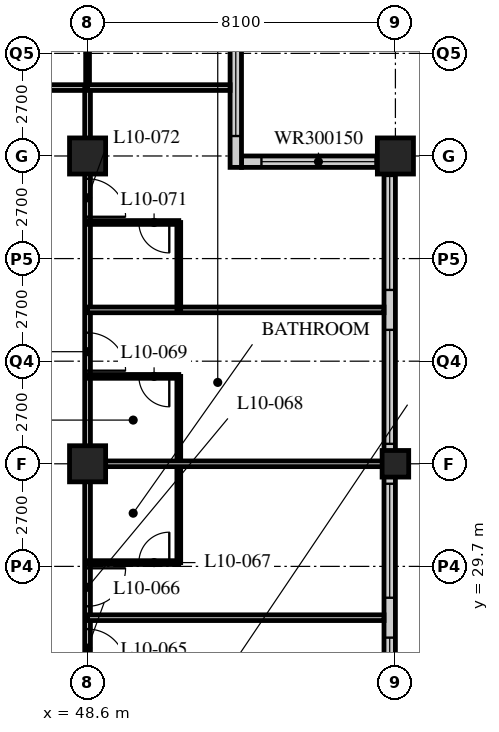
"""IFC4 building model, lengths in metres.
Left out: names, types, materials, properties, quantities, classifications, styles, units other than length and angle.
Written with IfcOpenShell. Run it as: python <this file> out.ifc"""

import sys

from ifc_helpers import new_model, si_unit, direction, frame, frame_2d, origin, origin_2d, place, context, subcontext, project, spatial, rectangle, hollow_rectangle, extrude, element, fill, save


model = new_model("IFC4")
c1 = context("Model", 3, precision=1e-05, world=origin(), true_north=direction((0.0, 1.0)))
c2 = subcontext(c1, "Body", "Model", "MODEL_VIEW")
j1 = project(units=[si_unit("LENGTHUNIT", "METRE"), si_unit("PLANEANGLEUNIT", "RADIAN")], contexts=[c1])
p1 = place(None, origin())
s1 = spatial("IfcSite", under=j1, at=p1, CompositionType="ELEMENT")
p2 = place(p1, origin())
s2 = spatial("IfcBuilding", under=s1, at=p2, CompositionType="ELEMENT")
p3 = place(p2, frame((0.0, 0.0, 46.6)))
s3 = spatial("IfcBuildingStorey", under=s2, at=p3, CompositionType="ELEMENT", Elevation=46.6)
for number, where, z_axis, x_axis in (
    (1, (48.6, 32.4, 0.0), (0.0, 0.0, 1.0), (1.0, 0.0, 0.0)),
    (2, (48.6, 40.5, 0.0), (0.0, 0.0, 1.0), (1.0, 0.0, 0.0)),
):
    element("IfcColumn", number, at=place(p3, frame(where, z_axis=z_axis, x_axis=x_axis)), inside=s3, PredefinedType="COLUMN", context=c2, shape_type="SweptSolid", body=[
        extrude(hollow_rectangle(XDim=0.95, YDim=0.95, WallThickness=0.095, at=origin_2d()), origin(), (0.0, 0.0, 1.0), 3.4),
    ])
p4 = place(p3, frame((56.7, 32.4, 0.0), z_axis=(0.0, 0.0, 1.0), x_axis=(1.0, 0.0, 0.0)))
e3 = element("IfcColumn", 3, at=p4, inside=s3, PredefinedType="COLUMN", context=c2, shape_type="SweptSolid", body=[
    extrude(hollow_rectangle(XDim=0.7, YDim=0.7, WallThickness=0.06, at=origin_2d()), origin(), (0.0, 0.0, 1.0), 3.4),
])
p5 = place(p3, frame((56.7, 40.5, 0.0), z_axis=(0.0, 0.0, 1.0), x_axis=(1.0, 0.0, 0.0)))
e4 = element("IfcColumn", 4, at=p5, inside=s3, PredefinedType="COLUMN", context=c2, shape_type="SweptSolid", body=[
    extrude(hollow_rectangle(XDim=0.95, YDim=0.95, WallThickness=0.095, at=origin_2d()), origin(), (0.0, 0.0, 1.0), 3.4),
])
p6 = place(p3, frame((56.55, 8.4, 0.0), z_axis=(0.0, 0.0, 1.0), x_axis=(0.0, 1.0, 0.0)))
e5 = element("IfcWall", 5, at=p6, inside=s3, PredefinedType="SOLIDWALL", context=c2, shape_type="SweptSolid", body=[
    extrude(rectangle(XDim=32.1, YDim=0.3, at=frame_2d((16.05, 0.0))), origin(), (0.0, 0.0, 1.0), 3.19),
])
p7 = place(p6, frame((0.225, 0.0, 0.9)))
e6 = element("IfcOpeningElement", 6, at=p7, cuts=e5, PredefinedType="OPENING", context=c2, shape_type="SweptSolid", body=[
    extrude(rectangle(XDim=3.0, YDim=2.0, at=frame_2d((1.5, 1.0))), frame((0.0, 0.16, 0.0), z_axis=(0.0, -1.0, 0.0), x_axis=(1.0, 0.0, 0.0)), (0.0, 0.0, 1.0), 0.32),
])
p8 = place(p6, frame((4.275, 0.0, 0.9)))
e7 = element("IfcOpeningElement", 7, at=p8, cuts=e5, PredefinedType="OPENING", context=c2, shape_type="SweptSolid", body=[
    extrude(rectangle(XDim=3.0, YDim=2.0, at=frame_2d((1.5, 1.0))), frame((0.0, 0.16, 0.0), z_axis=(0.0, -1.0, 0.0), x_axis=(1.0, 0.0, 0.0)), (0.0, 0.0, 1.0), 0.32),
])
p9 = place(p6, frame((8.325, 0.0, 0.9)))
e8 = element("IfcOpeningElement", 8, at=p9, cuts=e5, PredefinedType="OPENING", context=c2, shape_type="SweptSolid", body=[
    extrude(rectangle(XDim=3.0, YDim=2.0, at=frame_2d((1.5, 1.0))), frame((0.0, 0.16, 0.0), z_axis=(0.0, -1.0, 0.0), x_axis=(1.0, 0.0, 0.0)), (0.0, 0.0, 1.0), 0.32),
])
p10 = place(p6, frame((12.375, 0.0, 0.9)))
e9 = element("IfcOpeningElement", 9, at=p10, cuts=e5, PredefinedType="OPENING", context=c2, shape_type="SweptSolid", body=[
    extrude(rectangle(XDim=3.0, YDim=2.0, at=frame_2d((1.5, 1.0))), frame((0.0, 0.16, 0.0), z_axis=(0.0, -1.0, 0.0), x_axis=(1.0, 0.0, 0.0)), (0.0, 0.0, 1.0), 0.32),
])
p11 = place(p6, frame((16.425, 0.0, 0.9)))
e10 = element("IfcOpeningElement", 10, at=p11, cuts=e5, PredefinedType="OPENING", context=c2, shape_type="SweptSolid", body=[
    extrude(rectangle(XDim=3.0, YDim=2.0, at=frame_2d((1.5, 1.0))), frame((0.0, 0.16, 0.0), z_axis=(0.0, -1.0, 0.0), x_axis=(1.0, 0.0, 0.0)), (0.0, 0.0, 1.0), 0.32),
])
p12 = place(p6, frame((20.475, 0.0, 0.9)))
e11 = element("IfcOpeningElement", 11, at=p12, cuts=e5, PredefinedType="OPENING", context=c2, shape_type="SweptSolid", body=[
    extrude(rectangle(XDim=3.0, YDim=2.0, at=frame_2d((1.5, 1.0))), frame((0.0, 0.16, 0.0), z_axis=(0.0, -1.0, 0.0), x_axis=(1.0, 0.0, 0.0)), (0.0, 0.0, 1.0), 0.32),
])
p13 = place(p6, frame((24.525, 0.0, 0.9)))
e12 = element("IfcOpeningElement", 12, at=p13, cuts=e5, PredefinedType="OPENING", context=c2, shape_type="SweptSolid", body=[
    extrude(rectangle(XDim=3.0, YDim=2.0, at=frame_2d((1.5, 1.0))), frame((0.0, 0.16, 0.0), z_axis=(0.0, -1.0, 0.0), x_axis=(1.0, 0.0, 0.0)), (0.0, 0.0, 1.0), 0.32),
])
p14 = place(p6, frame((28.575, 0.0, 0.9)))
e13 = element("IfcOpeningElement", 13, at=p14, cuts=e5, PredefinedType="OPENING", context=c2, shape_type="SweptSolid", body=[
    extrude(rectangle(XDim=3.0, YDim=2.0, at=frame_2d((1.5, 1.0))), frame((0.0, 0.16, 0.0), z_axis=(0.0, -1.0, 0.0), x_axis=(1.0, 0.0, 0.0)), (0.0, 0.0, 1.0), 0.32),
])
p15 = place(p3, frame((56.4, 40.35, 0.0), z_axis=(0.0, 0.0, 1.0), x_axis=(-1.0, 0.0, 0.0)))
e14 = element("IfcWall", 14, at=p15, inside=s3, PredefinedType="SOLIDWALL", context=c2, shape_type="SweptSolid", body=[
    extrude(rectangle(XDim=3.75, YDim=0.3, at=frame_2d((1.875, 0.0))), origin(), (0.0, 0.0, 1.0), 3.19),
])
p16 = place(p15, frame((0.225, 0.0, 0.9)))
e15 = element("IfcOpeningElement", 15, at=p16, cuts=e14, PredefinedType="OPENING", context=c2, shape_type="SweptSolid", body=[
    extrude(rectangle(XDim=3.0, YDim=1.5, at=frame_2d((1.5, 0.75))), frame((0.0, 0.16, 0.0), z_axis=(0.0, -1.0, 0.0), x_axis=(1.0, 0.0, 0.0)), (0.0, 0.0, 1.0), 0.32),
])
p17 = place(p3, frame((52.5, 40.2, 0.0), z_axis=(0.0, 0.0, 1.0), x_axis=(0.0, 1.0, 0.0)))
e16 = element("IfcWall", 16, at=p17, inside=s3, PredefinedType="SOLIDWALL", context=c2, shape_type="SweptSolid", body=[
    extrude(rectangle(XDim=4.35, YDim=0.3, at=frame_2d((2.175, 0.0))), origin(), (0.0, 0.0, 1.0), 3.19),
])
p18 = place(p17, frame((0.825, 0.0, 0.9)))
e17 = element("IfcOpeningElement", 17, at=p18, cuts=e16, PredefinedType="OPENING", context=c2, shape_type="SweptSolid", body=[
    extrude(rectangle(XDim=3.0, YDim=1.5, at=frame_2d((1.5, 0.75))), frame((0.0, 0.16, 0.0), z_axis=(0.0, -1.0, 0.0), x_axis=(1.0, 0.0, 0.0)), (0.0, 0.0, 1.0), 0.32),
])
p19 = place(p3, frame((8.1, 42.3, 0.0), z_axis=(0.0, 0.0, 1.0), x_axis=(1.0, 0.0, 0.0)))
e18 = element("IfcWall", 18, at=p19, inside=s3, PredefinedType="PARTITIONING", context=c2, shape_type="SweptSolid", body=[
    extrude(rectangle(XDim=40.5, YDim=0.15, at=frame_2d((20.25, 0.0))), origin(), (0.0, 0.0, 1.0), 3.19),
])
p20 = place(p19, frame((6.5, 0.0, 0.0)))
e19 = element("IfcOpeningElement", 19, at=p20, cuts=e18, PredefinedType="OPENING", context=c2, shape_type="SweptSolid", body=[
    extrude(rectangle(XDim=1.0, YDim=2.1, at=frame_2d((0.5, 1.05))), frame((0.0, 0.085, 0.0), z_axis=(0.0, -1.0, 0.0), x_axis=(1.0, 0.0, 0.0)), (0.0, 0.0, 1.0), 0.17),
])
p21 = place(p19, frame((10.55, 0.0, 0.0)))
e20 = element("IfcOpeningElement", 20, at=p21, cuts=e18, PredefinedType="OPENING", context=c2, shape_type="SweptSolid", body=[
    extrude(rectangle(XDim=1.0, YDim=2.1, at=frame_2d((0.5, 1.05))), frame((0.0, 0.085, 0.0), z_axis=(0.0, -1.0, 0.0), x_axis=(1.0, 0.0, 0.0)), (0.0, 0.0, 1.0), 0.17),
])
p22 = place(p19, frame((14.6, 0.0, 0.0)))
e21 = element("IfcOpeningElement", 21, at=p22, cuts=e18, PredefinedType="OPENING", context=c2, shape_type="SweptSolid", body=[
    extrude(rectangle(XDim=1.0, YDim=2.1, at=frame_2d((0.5, 1.05))), frame((0.0, 0.085, 0.0), z_axis=(0.0, -1.0, 0.0), x_axis=(1.0, 0.0, 0.0)), (0.0, 0.0, 1.0), 0.17),
])
p23 = place(p19, frame((18.65, 0.0, 0.0)))
e22 = element("IfcOpeningElement", 22, at=p23, cuts=e18, PredefinedType="OPENING", context=c2, shape_type="SweptSolid", body=[
    extrude(rectangle(XDim=1.0, YDim=2.1, at=frame_2d((0.5, 1.05))), frame((0.0, 0.085, 0.0), z_axis=(0.0, -1.0, 0.0), x_axis=(1.0, 0.0, 0.0)), (0.0, 0.0, 1.0), 0.17),
])
p24 = place(p19, frame((22.7, 0.0, 0.0)))
e23 = element("IfcOpeningElement", 23, at=p24, cuts=e18, PredefinedType="OPENING", context=c2, shape_type="SweptSolid", body=[
    extrude(rectangle(XDim=1.0, YDim=2.1, at=frame_2d((0.5, 1.05))), frame((0.0, 0.085, 0.0), z_axis=(0.0, -1.0, 0.0), x_axis=(1.0, 0.0, 0.0)), (0.0, 0.0, 1.0), 0.17),
])
p25 = place(p19, frame((26.75, 0.0, 0.0)))
e24 = element("IfcOpeningElement", 24, at=p25, cuts=e18, PredefinedType="OPENING", context=c2, shape_type="SweptSolid", body=[
    extrude(rectangle(XDim=1.0, YDim=2.1, at=frame_2d((0.5, 1.05))), frame((0.0, 0.085, 0.0), z_axis=(0.0, -1.0, 0.0), x_axis=(1.0, 0.0, 0.0)), (0.0, 0.0, 1.0), 0.17),
])
p26 = place(p19, frame((30.8, 0.0, 0.0)))
e25 = element("IfcOpeningElement", 25, at=p26, cuts=e18, PredefinedType="OPENING", context=c2, shape_type="SweptSolid", body=[
    extrude(rectangle(XDim=1.0, YDim=2.1, at=frame_2d((0.5, 1.05))), frame((0.0, 0.085, 0.0), z_axis=(0.0, -1.0, 0.0), x_axis=(1.0, 0.0, 0.0)), (0.0, 0.0, 1.0), 0.17),
])
p27 = place(p19, frame((34.85, 0.0, 0.0)))
e26 = element("IfcOpeningElement", 26, at=p27, cuts=e18, PredefinedType="OPENING", context=c2, shape_type="SweptSolid", body=[
    extrude(rectangle(XDim=1.0, YDim=2.1, at=frame_2d((0.5, 1.05))), frame((0.0, 0.085, 0.0), z_axis=(0.0, -1.0, 0.0), x_axis=(1.0, 0.0, 0.0)), (0.0, 0.0, 1.0), 0.17),
])
p28 = place(p19, frame((36.875, 0.0, 0.0)))
e27 = element("IfcOpeningElement", 27, at=p28, cuts=e18, PredefinedType="OPENING", context=c2, shape_type="SweptSolid", body=[
    extrude(rectangle(XDim=1.0, YDim=2.1, at=frame_2d((0.5, 1.05))), frame((0.0, 0.085, 0.0), z_axis=(0.0, -1.0, 0.0), x_axis=(1.0, 0.0, 0.0)), (0.0, 0.0, 1.0), 0.17),
])
p29 = place(p19, frame((2.625, 0.0, 0.0)))
e28 = element("IfcOpeningElement", 28, at=p29, cuts=e18, PredefinedType="OPENING", context=c2, shape_type="SweptSolid", body=[
    extrude(rectangle(XDim=1.0, YDim=2.1, at=frame_2d((0.5, 1.05))), frame((0.0, 0.085, 0.0), z_axis=(0.0, -1.0, 0.0), x_axis=(1.0, 0.0, 0.0)), (0.0, 0.0, 1.0), 0.17),
])
p30 = place(p3, frame((48.6, 16.2, 0.0), z_axis=(0.0, 0.0, 1.0), x_axis=(0.0, 1.0, 0.0)))
e29 = element("IfcWall", 29, at=p30, inside=s3, PredefinedType="PARTITIONING", context=c2, shape_type="SweptSolid", body=[
    extrude(rectangle(XDim=26.1, YDim=0.15, at=frame_2d((13.05, 0.0))), origin(), (0.0, 0.0, 1.0), 2.578),
])
p31 = place(p30, frame((2.75, 0.0, 0.0)))
e30 = element("IfcOpeningElement", 30, at=p31, cuts=e29, PredefinedType="OPENING", context=c2, shape_type="SweptSolid", body=[
    extrude(rectangle(XDim=1.0, YDim=2.1, at=frame_2d((0.5, 1.05))), frame((0.0, 0.085, 0.0), z_axis=(0.0, -1.0, 0.0), x_axis=(1.0, 0.0, 0.0)), (0.0, 0.0, 1.0), 0.17),
])
p32 = place(p30, frame((4.35, 0.0, 0.0)))
e31 = element("IfcOpeningElement", 31, at=p32, cuts=e29, PredefinedType="OPENING", context=c2, shape_type="SweptSolid", body=[
    extrude(rectangle(XDim=1.0, YDim=2.1, at=frame_2d((0.5, 1.05))), frame((0.0, 0.085, 0.0), z_axis=(0.0, -1.0, 0.0), x_axis=(1.0, 0.0, 0.0)), (0.0, 0.0, 1.0), 0.17),
])
p33 = place(p30, frame((10.85, 0.0, 0.0)))
e32 = element("IfcOpeningElement", 32, at=p33, cuts=e29, PredefinedType="OPENING", context=c2, shape_type="SweptSolid", body=[
    extrude(rectangle(XDim=1.0, YDim=2.1, at=frame_2d((0.5, 1.05))), frame((0.0, 0.085, 0.0), z_axis=(0.0, -1.0, 0.0), x_axis=(1.0, 0.0, 0.0)), (0.0, 0.0, 1.0), 0.17),
])
p34 = place(p30, frame((12.45, 0.0, 0.0)))
e33 = element("IfcOpeningElement", 33, at=p34, cuts=e29, PredefinedType="OPENING", context=c2, shape_type="SweptSolid", body=[
    extrude(rectangle(XDim=1.0, YDim=2.1, at=frame_2d((0.5, 1.05))), frame((0.0, 0.085, 0.0), z_axis=(0.0, -1.0, 0.0), x_axis=(1.0, 0.0, 0.0)), (0.0, 0.0, 1.0), 0.17),
])
p35 = place(p30, frame((18.65, 0.0, 0.0)))
e34 = element("IfcOpeningElement", 34, at=p35, cuts=e29, PredefinedType="OPENING", context=c2, shape_type="SweptSolid", body=[
    extrude(rectangle(XDim=1.0, YDim=2.1, at=frame_2d((0.5, 1.05))), frame((0.0, 0.085, 0.0), z_axis=(0.0, -1.0, 0.0), x_axis=(1.0, 0.0, 0.0)), (0.0, 0.0, 1.0), 0.17),
])
p36 = place(p30, frame((22.7, 0.0, 0.0)))
e35 = element("IfcOpeningElement", 35, at=p36, cuts=e29, PredefinedType="OPENING", context=c2, shape_type="SweptSolid", body=[
    extrude(rectangle(XDim=1.0, YDim=2.1, at=frame_2d((0.5, 1.05))), frame((0.0, 0.085, 0.0), z_axis=(0.0, -1.0, 0.0), x_axis=(1.0, 0.0, 0.0)), (0.0, 0.0, 1.0), 0.17),
])
p37 = place(p3, frame((48.6, 28.35, 0.0), z_axis=(0.0, 0.0, 1.0), x_axis=(1.0, 0.0, 0.0)))
e36 = element("IfcWall", 36, at=p37, inside=s3, PredefinedType="PARTITIONING", context=c2, shape_type="SweptSolid", body=[
    extrude(rectangle(XDim=7.8, YDim=0.15, at=frame_2d((3.9, 0.0))), origin(), (0.0, 0.0, 1.0), 3.19),
])
p38 = place(p3, frame((51.0, 29.8, 0.0), z_axis=(0.0, 0.0, 1.0), x_axis=(0.0, 1.0, 0.0)))
e37 = element("IfcWall", 37, at=p38, inside=s3, PredefinedType="PARTITIONING", context=c2, shape_type="SweptSolid", body=[
    extrude(rectangle(XDim=4.9, YDim=0.1, at=frame_2d((2.45, 0.0))), origin(), (0.0, 0.0, 1.0), 3.19),
])
p39 = place(p3, frame((48.6, 29.8, 0.0), z_axis=(0.0, 0.0, 1.0), x_axis=(1.0, 0.0, 0.0)))
e38 = element("IfcWall", 38, at=p39, inside=s3, PredefinedType="PARTITIONING", context=c2, shape_type="SweptSolid", body=[
    extrude(rectangle(XDim=2.4, YDim=0.1, at=frame_2d((1.2, 0.0))), origin(), (0.0, 0.0, 1.0), 3.19),
])
p40 = place(p39, frame((1.35, 0.0, 0.0)))
e39 = element("IfcOpeningElement", 39, at=p40, cuts=e38, PredefinedType="OPENING", context=c2, shape_type="SweptSolid", body=[
    extrude(rectangle(XDim=0.8, YDim=2.1, at=frame_2d((0.4, 1.05))), frame((0.0, 0.06, 0.0), z_axis=(0.0, -1.0, 0.0), x_axis=(1.0, 0.0, 0.0)), (0.0, 0.0, 1.0), 0.12),
])
p41 = place(p3, frame((48.6, 32.4, 0.0), z_axis=(0.0, 0.0, 1.0), x_axis=(1.0, 0.0, 0.0)))
e40 = element("IfcWall", 40, at=p41, inside=s3, PredefinedType="PARTITIONING", context=c2, shape_type="SweptSolid", body=[
    extrude(rectangle(XDim=7.8, YDim=0.15, at=frame_2d((3.9, 0.0))), origin(), (0.0, 0.0, 1.0), 2.578),
])
p42 = place(p3, frame((48.6, 34.7, 0.0), z_axis=(0.0, 0.0, 1.0), x_axis=(1.0, 0.0, 0.0)))
e41 = element("IfcWall", 41, at=p42, inside=s3, PredefinedType="PARTITIONING", context=c2, shape_type="SweptSolid", body=[
    extrude(rectangle(XDim=2.4, YDim=0.1, at=frame_2d((1.2, 0.0))), origin(), (0.0, 0.0, 1.0), 3.19),
])
p43 = place(p42, frame((1.35, 0.0, 0.0)))
e42 = element("IfcOpeningElement", 42, at=p43, cuts=e41, PredefinedType="OPENING", context=c2, shape_type="SweptSolid", body=[
    extrude(rectangle(XDim=0.8, YDim=2.1, at=frame_2d((0.4, 1.05))), frame((0.0, 0.06, 0.0), z_axis=(0.0, -1.0, 0.0), x_axis=(1.0, 0.0, 0.0)), (0.0, 0.0, 1.0), 0.12),
])
p44 = place(p3, frame((48.6, 36.45, 0.0), z_axis=(0.0, 0.0, 1.0), x_axis=(1.0, 0.0, 0.0)))
e43 = element("IfcWall", 43, at=p44, inside=s3, PredefinedType="PARTITIONING", context=c2, shape_type="SweptSolid", body=[
    extrude(rectangle(XDim=7.8, YDim=0.15, at=frame_2d((3.9, 0.0))), origin(), (0.0, 0.0, 1.0), 3.19),
])
p45 = place(p3, frame((51.0, 36.45, 0.0), z_axis=(0.0, 0.0, 1.0), x_axis=(0.0, 1.0, 0.0)))
e44 = element("IfcWall", 44, at=p45, inside=s3, PredefinedType="PARTITIONING", context=c2, shape_type="SweptSolid", body=[
    extrude(rectangle(XDim=2.3, YDim=0.1, at=frame_2d((1.15, 0.0))), origin(), (0.0, 0.0, 1.0), 3.19),
])
p46 = place(p3, frame((48.6, 38.75, 0.0), z_axis=(0.0, 0.0, 1.0), x_axis=(1.0, 0.0, 0.0)))
e45 = element("IfcWall", 45, at=p46, inside=s3, PredefinedType="PARTITIONING", context=c2, shape_type="SweptSolid", body=[
    extrude(rectangle(XDim=2.4, YDim=0.1, at=frame_2d((1.2, 0.0))), origin(), (0.0, 0.0, 1.0), 3.19),
])
p47 = place(p46, frame((1.35, 0.0, 0.0)))
e46 = element("IfcOpeningElement", 46, at=p47, cuts=e45, PredefinedType="OPENING", context=c2, shape_type="SweptSolid", body=[
    extrude(rectangle(XDim=0.8, YDim=2.1, at=frame_2d((0.4, 1.05))), frame((0.0, 0.06, 0.0), z_axis=(0.0, -1.0, 0.0), x_axis=(1.0, 0.0, 0.0)), (0.0, 0.0, 1.0), 0.12),
])
p48 = place(p3, frame((48.6, 42.3, 0.0), z_axis=(0.0, 0.0, 1.0), x_axis=(0.0, 1.0, 0.0)))
e47 = element("IfcWall", 47, at=p48, inside=s3, PredefinedType="PARTITIONING", context=c2, shape_type="SweptSolid", body=[
    extrude(rectangle(XDim=1.95, YDim=0.1, at=frame_2d((0.975, 0.0))), origin(), (0.0, 0.0, 1.0), 2.578),
])
p49 = place(p3, frame((48.6, 42.3, 0.0), z_axis=(0.0, 0.0, 1.0), x_axis=(1.0, 0.0, 0.0)))
e48 = element("IfcWall", 48, at=p49, inside=s3, PredefinedType="PARTITIONING", context=c2, shape_type="SweptSolid", body=[
    extrude(rectangle(XDim=3.75, YDim=0.15, at=frame_2d((1.875, 0.0))), origin(), (0.0, 0.0, 1.0), 3.19),
])
p50 = place(p11, origin())
e49 = element("IfcWindow", 49, at=p50, inside=s3, PartitioningType="SINGLE_PANEL", PredefinedType="WINDOW", context=c2, shape_type="SweptSolid", body=[
    extrude(rectangle(XDim=3.0, YDim=2.0, at=frame_2d((1.5, 1.0))), frame((0.0, 0.03, 0.0), z_axis=(0.0, -1.0, 0.0), x_axis=(1.0, 0.0, 0.0)), (0.0, 0.0, 1.0), 0.06),
])
fill(e10, e49)
p51 = place(p12, origin())
e50 = element("IfcWindow", 50, at=p51, inside=s3, PartitioningType="SINGLE_PANEL", PredefinedType="WINDOW", context=c2, shape_type="SweptSolid", body=[
    extrude(rectangle(XDim=3.0, YDim=2.0, at=frame_2d((1.5, 1.0))), frame((0.0, 0.03, 0.0), z_axis=(0.0, -1.0, 0.0), x_axis=(1.0, 0.0, 0.0)), (0.0, 0.0, 1.0), 0.06),
])
fill(e11, e50)
p52 = place(p13, origin())
e51 = element("IfcWindow", 51, at=p52, inside=s3, PartitioningType="SINGLE_PANEL", PredefinedType="WINDOW", context=c2, shape_type="SweptSolid", body=[
    extrude(rectangle(XDim=3.0, YDim=2.0, at=frame_2d((1.5, 1.0))), frame((0.0, 0.03, 0.0), z_axis=(0.0, -1.0, 0.0), x_axis=(1.0, 0.0, 0.0)), (0.0, 0.0, 1.0), 0.06),
])
fill(e12, e51)
p53 = place(p14, origin())
e52 = element("IfcWindow", 52, at=p53, inside=s3, PartitioningType="SINGLE_PANEL", PredefinedType="WINDOW", context=c2, shape_type="SweptSolid", body=[
    extrude(rectangle(XDim=3.0, YDim=2.0, at=frame_2d((1.5, 1.0))), frame((0.0, 0.03, 0.0), z_axis=(0.0, -1.0, 0.0), x_axis=(1.0, 0.0, 0.0)), (0.0, 0.0, 1.0), 0.06),
])
fill(e13, e52)
p54 = place(p16, origin())
e53 = element("IfcWindow", 53, at=p54, inside=s3, PartitioningType="SINGLE_PANEL", PredefinedType="WINDOW", context=c2, shape_type="SweptSolid", body=[
    extrude(rectangle(XDim=3.0, YDim=1.5, at=frame_2d((1.5, 0.75))), frame((0.0, 0.03, 0.0), z_axis=(0.0, -1.0, 0.0), x_axis=(1.0, 0.0, 0.0)), (0.0, 0.0, 1.0), 0.06),
])
fill(e15, e53)
p55 = place(p18, origin())
e54 = element("IfcWindow", 54, at=p55, inside=s3, PartitioningType="SINGLE_PANEL", PredefinedType="WINDOW", context=c2, shape_type="SweptSolid", body=[
    extrude(rectangle(XDim=3.0, YDim=1.5, at=frame_2d((1.5, 0.75))), frame((0.0, 0.03, 0.0), z_axis=(0.0, -1.0, 0.0), x_axis=(1.0, 0.0, 0.0)), (0.0, 0.0, 1.0), 0.06),
])
fill(e17, e54)
p56 = place(p33, origin())
e55 = element("IfcDoor", 55, at=p56, inside=s3, OperationType="SINGLE_SWING_RIGHT", PredefinedType="DOOR", context=c2, shape_type="SweptSolid", body=[
    extrude(rectangle(XDim=1.0, YDim=2.1, at=frame_2d((0.5, 1.05))), frame((0.0, 0.025, 0.0), z_axis=(0.0, -1.0, 0.0), x_axis=(1.0, 0.0, 0.0)), (0.0, 0.0, 1.0), 0.05),
])
fill(e32, e55)
p57 = place(p40, origin())
e56 = element("IfcDoor", 56, at=p57, inside=s3, OperationType="SINGLE_SWING_RIGHT", PredefinedType="DOOR", context=c2, shape_type="SweptSolid", body=[
    extrude(rectangle(XDim=0.8, YDim=2.1, at=frame_2d((0.4, 1.05))), frame((0.0, 0.025, 0.0), z_axis=(0.0, -1.0, 0.0), x_axis=(1.0, 0.0, 0.0)), (0.0, 0.0, 1.0), 0.05),
])
fill(e39, e56)
p58 = place(p34, origin())
e57 = element("IfcDoor", 57, at=p58, inside=s3, OperationType="SINGLE_SWING_LEFT", PredefinedType="DOOR", context=c2, shape_type="SweptSolid", body=[
    extrude(rectangle(XDim=1.0, YDim=2.1, at=frame_2d((0.5, 1.05))), frame((0.0, 0.025, 0.0), z_axis=(0.0, -1.0, 0.0), x_axis=(1.0, 0.0, 0.0)), (0.0, 0.0, 1.0), 0.05),
])
fill(e33, e57)
p59 = place(p43, origin())
e58 = element("IfcDoor", 58, at=p59, inside=s3, OperationType="SINGLE_SWING_LEFT", PredefinedType="DOOR", context=c2, shape_type="SweptSolid", body=[
    extrude(rectangle(XDim=0.8, YDim=2.1, at=frame_2d((0.4, 1.05))), frame((0.0, 0.025, 0.0), z_axis=(0.0, -1.0, 0.0), x_axis=(1.0, 0.0, 0.0)), (0.0, 0.0, 1.0), 0.05),
])
fill(e42, e58)
p60 = place(p35, origin())
e59 = element("IfcDoor", 59, at=p60, inside=s3, OperationType="SINGLE_SWING_RIGHT", PredefinedType="DOOR", context=c2, shape_type="SweptSolid", body=[
    extrude(rectangle(XDim=1.0, YDim=2.1, at=frame_2d((0.5, 1.05))), frame((0.0, 0.025, 0.0), z_axis=(0.0, -1.0, 0.0), x_axis=(1.0, 0.0, 0.0)), (0.0, 0.0, 1.0), 0.05),
])
fill(e34, e59)
p61 = place(p47, origin())
e60 = element("IfcDoor", 60, at=p61, inside=s3, OperationType="SINGLE_SWING_LEFT", PredefinedType="DOOR", context=c2, shape_type="SweptSolid", body=[
    extrude(rectangle(XDim=0.8, YDim=2.1, at=frame_2d((0.4, 1.05))), frame((0.0, 0.025, 0.0), z_axis=(0.0, -1.0, 0.0), x_axis=(1.0, 0.0, 0.0)), (0.0, 0.0, 1.0), 0.05),
])
fill(e46, e60)
p62 = place(p36, origin())
e61 = element("IfcDoor", 61, at=p62, inside=s3, OperationType="SINGLE_SWING_RIGHT", PredefinedType="DOOR", context=c2, shape_type="SweptSolid", body=[
    extrude(rectangle(XDim=1.0, YDim=2.1, at=frame_2d((0.5, 1.05))), frame((0.0, 0.025, 0.0), z_axis=(0.0, -1.0, 0.0), x_axis=(1.0, 0.0, 0.0)), (0.0, 0.0, 1.0), 0.05),
])
fill(e35, e61)
save(model, sys.argv[1])
